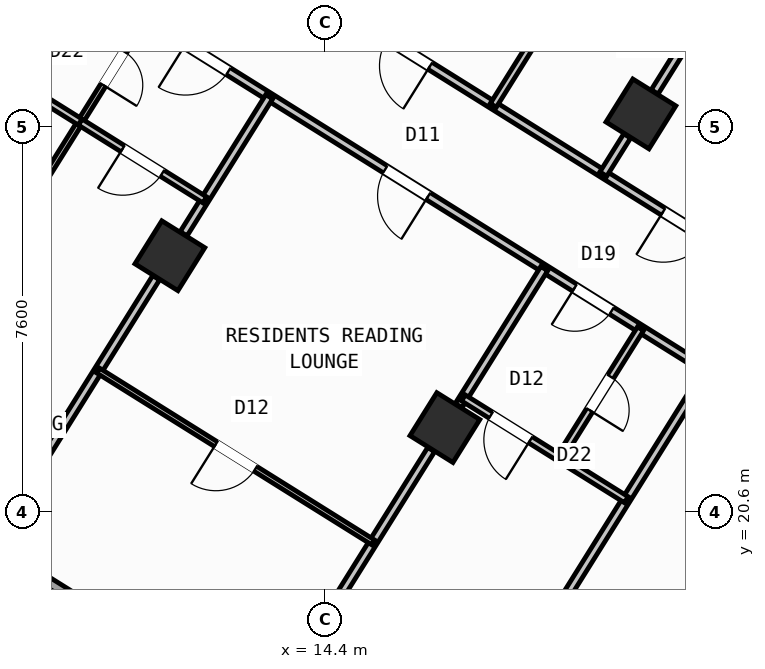
"""IFC4 building model, lengths in metres.
Left out: names, types, materials, properties, quantities, classifications, styles, units other than length and angle.
Written with IfcOpenShell. Run it as: python <this file> out.ifc"""

import sys

from ifc_helpers import new_model, si_unit, direction, frame, frame_2d, origin, origin_2d, place, context, subcontext, project, spatial, rectangle, hollow_rectangle, extrude, source, transform, mapped, element, fill, save


model = new_model("IFC4")
c1 = context("Model", 3, precision=1e-05, world=origin(), true_north=direction((0.0, 1.0)))
c2 = subcontext(c1, "Body", "Model", "MODEL_VIEW")
j1 = project(units=[si_unit("LENGTHUNIT", "METRE"), si_unit("PLANEANGLEUNIT", "RADIAN")], contexts=[c1])
p1 = place(None, origin())
s1 = spatial("IfcSite", under=j1, at=p1, CompositionType="ELEMENT")
p2 = place(p1, origin())
s2 = spatial("IfcBuilding", under=s1, at=p2, CompositionType="ELEMENT")
p3 = place(p2, frame((0.0, 0.0, 45.6)))
s3 = spatial("IfcBuildingStorey", under=s2, at=p3, CompositionType="ELEMENT", Elevation=45.6)
m1 = source(origin(), c2, "Body", "SweptSolid", [
    extrude(hollow_rectangle(XDim=1.0, YDim=1.0, WallThickness=0.04, at=origin_2d()), origin(), (0.0, 0.0, 1.0), 3.6),
])
for number, where, z_axis, x_axis in (
    (1, (22.191, 18.87, 0.0), (0.0, 0.0, 1.0), (-0.848, 0.53, 0.0)),
    (2, (20.632, 28.452, 0.0), (0.0, 0.0, 1.0), (-0.848, 0.53, 0.0)),
    (3, (16.764, 22.261, 0.0), (0.0, 0.0, 1.0), (-0.848, 0.53, 0.0)),
    (4, (11.336, 25.653, 0.0), (0.0, 0.0, 1.0), (-0.848, 0.53, 0.0)),
):
    element("IfcColumn", number, at=place(p3, frame(where, z_axis=z_axis, x_axis=x_axis)), inside=s3, PredefinedType="COLUMN", context=c2, shape_type="MappedRepresentation", body=[
        mapped(m1, transform((0.0, 0.0, 0.0), scale=1.0)),
    ])
p4 = place(p3, frame((29.268, 6.429, 0.0), z_axis=(0.0, 0.0, 1.0), x_axis=(-0.848049971435, 0.529916263149, 0.0)))
e5 = element("IfcWall", 5, at=p4, inside=s3, PredefinedType="STANDARD", context=c2, shape_type="SweptSolid", body=[
    extrude(rectangle(XDim=31.588, YDim=0.32, at=frame_2d((15.794, 0.0))), origin(), (0.0, 0.0, 1.0), 3.35),
])
p5 = place(p4, frame((16.362, 0.0, 0.0)))
e6 = element("IfcOpeningElement", 6, at=p5, cuts=e5, PredefinedType="OPENING", context=c2, shape_type="SweptSolid", body=[
    extrude(rectangle(XDim=1.2, YDim=2.15, at=frame_2d((0.6, 1.075))), frame((0.0, 0.17, 0.0), z_axis=(0.0, -1.0, 0.0), x_axis=(1.0, 0.0, 0.0)), (0.0, 0.0, 1.0), 0.34),
])
p6 = place(p4, frame((2.989, 0.0, 0.8)))
e7 = element("IfcOpeningElement", 7, at=p6, cuts=e5, PredefinedType="OPENING", context=c2, shape_type="SweptSolid", body=[
    extrude(rectangle(XDim=2.1, YDim=1.55, at=frame_2d((1.05, 0.775))), frame((0.0, 0.17, 0.0), z_axis=(0.0, -1.0, 0.0), x_axis=(1.0, 0.0, 0.0)), (0.0, 0.0, 1.0), 0.34),
])
p7 = place(p4, frame((8.359, 0.0, 0.8)))
e8 = element("IfcOpeningElement", 8, at=p7, cuts=e5, PredefinedType="OPENING", context=c2, shape_type="SweptSolid", body=[
    extrude(rectangle(XDim=2.1, YDim=1.55, at=frame_2d((1.05, 0.775))), frame((0.0, 0.17, 0.0), z_axis=(0.0, -1.0, 0.0), x_axis=(1.0, 0.0, 0.0)), (0.0, 0.0, 1.0), 0.34),
])
p8 = place(p4, frame((13.284, 0.0, 0.95)))
e9 = element("IfcOpeningElement", 9, at=p8, cuts=e5, PredefinedType="OPENING", context=c2, shape_type="SweptSolid", body=[
    extrude(rectangle(XDim=1.2, YDim=1.4, at=frame_2d((0.6, 0.7))), frame((0.0, 0.17, 0.0), z_axis=(0.0, -1.0, 0.0), x_axis=(1.0, 0.0, 0.0)), (0.0, 0.0, 1.0), 0.34),
])
p9 = place(p4, frame((20.259, 0.0, 0.95)))
e10 = element("IfcOpeningElement", 10, at=p9, cuts=e5, PredefinedType="OPENING", context=c2, shape_type="SweptSolid", body=[
    extrude(rectangle(XDim=1.2, YDim=1.4, at=frame_2d((0.6, 0.7))), frame((0.0, 0.17, 0.0), z_axis=(0.0, -1.0, 0.0), x_axis=(1.0, 0.0, 0.0)), (0.0, 0.0, 1.0), 0.34),
])
p10 = place(p4, frame((22.929, 0.0, 0.95)))
e11 = element("IfcOpeningElement", 11, at=p10, cuts=e5, PredefinedType="OPENING", context=c2, shape_type="SweptSolid", body=[
    extrude(rectangle(XDim=1.2, YDim=1.4, at=frame_2d((0.6, 0.7))), frame((0.0, 0.17, 0.0), z_axis=(0.0, -1.0, 0.0), x_axis=(1.0, 0.0, 0.0)), (0.0, 0.0, 1.0), 0.34),
])
p11 = place(p4, frame((26.106, 0.0, 0.85)))
e12 = element("IfcOpeningElement", 12, at=p11, cuts=e5, PredefinedType="OPENING", context=c2, shape_type="SweptSolid", body=[
    extrude(rectangle(XDim=1.5, YDim=1.5, at=frame_2d((0.75, 0.75))), frame((0.0, 0.17, 0.0), z_axis=(0.0, -1.0, 0.0), x_axis=(1.0, 0.0, 0.0)), (0.0, 0.0, 1.0), 0.34),
])
p12 = place(p4, frame((29.068, 0.0, 0.85)))
e13 = element("IfcOpeningElement", 13, at=p12, cuts=e5, PredefinedType="OPENING", context=c2, shape_type="SweptSolid", body=[
    extrude(rectangle(XDim=1.8, YDim=1.5, at=frame_2d((0.9, 0.75))), frame((0.0, 0.17, 0.0), z_axis=(0.0, -1.0, 0.0), x_axis=(1.0, 0.0, 0.0)), (0.0, 0.0, 1.0), 0.34),
])
p13 = place(p3, frame((2.415, 23.452, 0.0), z_axis=(0.0, 0.0, 1.0), x_axis=(0.52991049553, 0.848053575387, 0.0)))
e14 = element("IfcWall", 14, at=p13, inside=s3, PredefinedType="STANDARD", context=c2, shape_type="SweptSolid", body=[
    extrude(rectangle(XDim=21.587, YDim=0.32, at=frame_2d((10.794, 0.0))), origin(), (0.0, 0.0, 1.0), 2.725),
])
p14 = place(p13, frame((2.356, 0.0, 0.8)))
e15 = element("IfcOpeningElement", 15, at=p14, cuts=e14, PredefinedType="OPENING", context=c2, shape_type="SweptSolid", body=[
    extrude(rectangle(XDim=2.1, YDim=1.55, at=frame_2d((1.05, 0.775))), frame((0.0, 0.17, 0.0), z_axis=(0.0, -1.0, 0.0), x_axis=(1.0, 0.0, 0.0)), (0.0, 0.0, 1.0), 0.34),
])
p15 = place(p13, frame((8.639, 0.0, 1.0)))
e16 = element("IfcOpeningElement", 16, at=p15, cuts=e14, PredefinedType="OPENING", context=c2, shape_type="SweptSolid", body=[
    extrude(rectangle(XDim=0.9, YDim=1.25, at=frame_2d((0.45, 0.625))), frame((0.0, 0.17, 0.0), z_axis=(0.0, -1.0, 0.0), x_axis=(1.0, 0.0, 0.0)), (0.0, 0.0, 1.0), 0.34),
])
p16 = place(p13, frame((17.129, 0.0, 0.85)))
e17 = element("IfcOpeningElement", 17, at=p16, cuts=e14, PredefinedType="OPENING", context=c2, shape_type="SweptSolid", body=[
    extrude(rectangle(XDim=1.5, YDim=1.5, at=frame_2d((0.75, 0.75))), frame((0.0, 0.17, 0.0), z_axis=(0.0, -1.0, 0.0), x_axis=(1.0, 0.0, 0.0)), (0.0, 0.0, 1.0), 0.34),
])
p17 = place(p3, frame((14.138, 41.825, 0.0), z_axis=(0.0, 0.0, 1.0), x_axis=(0.848046498049, -0.529921821731, 0.0)))
e18 = element("IfcWall", 18, at=p17, inside=s3, PredefinedType="STANDARD", context=c2, shape_type="SweptSolid", body=[
    extrude(rectangle(XDim=31.588, YDim=0.32, at=frame_2d((15.794, 0.0))), origin(), (0.0, 0.0, 1.0), 3.35),
])
p18 = place(p17, frame((3.159, 0.0, 0.0)))
e19 = element("IfcOpeningElement", 19, at=p18, cuts=e18, PredefinedType="OPENING", context=c2, shape_type="SweptSolid", body=[
    extrude(rectangle(XDim=1.05, YDim=2.15, at=frame_2d((0.525, 1.075))), frame((0.0, 0.17, 0.0), z_axis=(0.0, -1.0, 0.0), x_axis=(1.0, 0.0, 0.0)), (0.0, 0.0, 1.0), 0.34),
])
p19 = place(p17, frame((0.906, 0.0, 1.0)))
e20 = element("IfcOpeningElement", 20, at=p19, cuts=e18, PredefinedType="OPENING", context=c2, shape_type="SweptSolid", body=[
    extrude(rectangle(XDim=0.9, YDim=1.25, at=frame_2d((0.45, 0.625))), frame((0.0, 0.17, 0.0), z_axis=(0.0, -1.0, 0.0), x_axis=(1.0, 0.0, 0.0)), (0.0, 0.0, 1.0), 0.34),
])
p20 = place(p17, frame((9.537, 0.0, 0.85)))
e21 = element("IfcOpeningElement", 21, at=p20, cuts=e18, PredefinedType="OPENING", context=c2, shape_type="SweptSolid", body=[
    extrude(rectangle(XDim=1.8, YDim=1.5, at=frame_2d((0.9, 0.75))), frame((0.0, 0.17, 0.0), z_axis=(0.0, -1.0, 0.0), x_axis=(1.0, 0.0, 0.0)), (0.0, 0.0, 1.0), 0.34),
])
p21 = place(p17, frame((13.899, 0.0, 0.85)))
e22 = element("IfcOpeningElement", 22, at=p21, cuts=e18, PredefinedType="OPENING", context=c2, shape_type="SweptSolid", body=[
    extrude(rectangle(XDim=1.5, YDim=1.5, at=frame_2d((0.75, 0.75))), frame((0.0, 0.17, 0.0), z_axis=(0.0, -1.0, 0.0), x_axis=(1.0, 0.0, 0.0)), (0.0, 0.0, 1.0), 0.34),
])
p22 = place(p17, frame((22.019, 0.0, 0.95)))
e23 = element("IfcOpeningElement", 23, at=p22, cuts=e18, PredefinedType="OPENING", context=c2, shape_type="SweptSolid", body=[
    extrude(rectangle(XDim=1.2, YDim=1.4, at=frame_2d((0.6, 0.7))), frame((0.0, 0.17, 0.0), z_axis=(0.0, -1.0, 0.0), x_axis=(1.0, 0.0, 0.0)), (0.0, 0.0, 1.0), 0.34),
])
p23 = place(p17, frame((27.569, 0.0, 0.95)))
e24 = element("IfcOpeningElement", 24, at=p23, cuts=e18, PredefinedType="OPENING", context=c2, shape_type="SweptSolid", body=[
    extrude(rectangle(XDim=1.2, YDim=1.4, at=frame_2d((0.6, 0.7))), frame((0.0, 0.17, 0.0), z_axis=(0.0, -1.0, 0.0), x_axis=(1.0, 0.0, 0.0)), (0.0, 0.0, 1.0), 0.34),
])
p24 = place(p3, frame((21.938, 23.391, 0.0), z_axis=(0.0, 0.0, 1.0), x_axis=(-0.529924725692, -0.848044683434, 0.0)))
e25 = element("IfcWall", 25, at=p24, inside=s3, PredefinedType="PARTITIONING", context=c2, shape_type="SweptSolid", body=[
    extrude(rectangle(XDim=10.35, YDim=0.16, at=frame_2d((5.175, 0.0))), origin(), (0.0, 0.0, 1.0), 3.34),
])
p25 = place(p3, frame((23.104, 25.256, 0.0), z_axis=(0.0, 0.0, 1.0), x_axis=(-0.848041752158, 0.529929416617, 0.0)))
e26 = element("IfcWall", 26, at=p25, inside=s3, PredefinedType="PARTITIONING", context=c2, shape_type="SweptSolid", body=[
    extrude(rectangle(XDim=16.73, YDim=0.16, at=frame_2d((8.365, 0.0))), origin(), (0.0, 0.0, 1.0), 3.34),
])
p26 = place(p25, frame((1.395, 0.0, 0.0)))
e27 = element("IfcOpeningElement", 27, at=p26, cuts=e26, PredefinedType="OPENING", context=c2, shape_type="SweptSolid", body=[
    extrude(rectangle(XDim=1.0, YDim=2.1, at=frame_2d((0.5, 1.05))), frame((0.0, 0.09, 0.0), z_axis=(0.0, -1.0, 0.0), x_axis=(1.0, 0.0, 0.0)), (0.0, 0.0, 1.0), 0.18),
])
p27 = place(p25, frame((7.82, 0.0, 0.0)))
e28 = element("IfcOpeningElement", 28, at=p27, cuts=e26, PredefinedType="OPENING", context=c2, shape_type="SweptSolid", body=[
    extrude(rectangle(XDim=1.0, YDim=2.1, at=frame_2d((0.5, 1.05))), frame((0.0, 0.09, 0.0), z_axis=(0.0, -1.0, 0.0), x_axis=(1.0, 0.0, 0.0)), (0.0, 0.0, 1.0), 0.18),
])
p28 = place(p25, frame((14.76, 0.0, 0.0)))
e29 = element("IfcOpeningElement", 29, at=p28, cuts=e26, PredefinedType="OPENING", context=c2, shape_type="SweptSolid", body=[
    extrude(rectangle(XDim=1.0, YDim=2.1, at=frame_2d((0.5, 1.05))), frame((0.0, 0.09, 0.0), z_axis=(0.0, -1.0, 0.0), x_axis=(1.0, 0.0, 0.0)), (0.0, 0.0, 1.0), 0.18),
])
p29 = place(p3, frame((21.938, 23.391, 0.0), z_axis=(0.0, 0.0, 1.0), x_axis=(-0.848045850158, 0.529922858565, 0.0)))
e30 = element("IfcWall", 30, at=p29, inside=s3, PredefinedType="PARTITIONING", context=c2, shape_type="SweptSolid", body=[
    extrude(rectangle(XDim=16.73, YDim=0.16, at=frame_2d((8.365, 0.0))), origin(), (0.0, 0.0, 1.0), 3.34),
])
p30 = place(p29, frame((2.22, 0.0, 0.0)))
e31 = element("IfcOpeningElement", 31, at=p30, cuts=e30, PredefinedType="OPENING", context=c2, shape_type="SweptSolid", body=[
    extrude(rectangle(XDim=0.86, YDim=2.05, at=frame_2d((0.43, 1.025))), frame((0.0, 0.09, 0.0), z_axis=(0.0, -1.0, 0.0), x_axis=(1.0, 0.0, 0.0)), (0.0, 0.0, 1.0), 0.18),
])
p31 = place(p29, frame((6.49, 0.0, 0.0)))
e32 = element("IfcOpeningElement", 32, at=p31, cuts=e30, PredefinedType="OPENING", context=c2, shape_type="SweptSolid", body=[
    extrude(rectangle(XDim=1.0, YDim=2.1, at=frame_2d((0.5, 1.05))), frame((0.0, 0.09, 0.0), z_axis=(0.0, -1.0, 0.0), x_axis=(1.0, 0.0, 0.0)), (0.0, 0.0, 1.0), 0.18),
])
p32 = place(p29, frame((11.14, 0.0, 0.0)))
e33 = element("IfcOpeningElement", 33, at=p32, cuts=e30, PredefinedType="OPENING", context=c2, shape_type="SweptSolid", body=[
    extrude(rectangle(XDim=1.0, YDim=2.1, at=frame_2d((0.5, 1.05))), frame((0.0, 0.09, 0.0), z_axis=(0.0, -1.0, 0.0), x_axis=(1.0, 0.0, 0.0)), (0.0, 0.0, 1.0), 0.18),
])
p33 = place(p3, frame((18.724, 25.399, 0.0), z_axis=(0.0, 0.0, 1.0), x_axis=(-0.529930102756, -0.848041323399, 0.0)))
e34 = element("IfcWall", 34, at=p33, inside=s3, PredefinedType="PARTITIONING", context=c2, shape_type="SweptSolid", body=[
    extrude(rectangle(XDim=3.188, YDim=0.16, at=frame_2d((1.594, 0.0))), origin(), (0.0, 0.0, 1.0), 2.725),
])
p34 = place(p3, frame((16.492, 21.827, 0.0), z_axis=(0.0, 0.0, 1.0), x_axis=(-0.529904608059, -0.848057254175, 0.0)))
e35 = element("IfcWall", 35, at=p34, inside=s3, PredefinedType="PARTITIONING", context=c2, shape_type="SweptSolid", body=[
    extrude(rectangle(XDim=5.351, YDim=0.16, at=frame_2d((2.675, 0.0))), origin(), (0.0, 0.0, 1.0), 2.725),
])
p35 = place(p3, frame((20.343, 20.838, 0.0), z_axis=(0.0, 0.0, 1.0), x_axis=(-0.848059820872, 0.529900500304, 0.0)))
e36 = element("IfcWall", 36, at=p35, inside=s3, PredefinedType="PLUMBINGWALL", context=c2, shape_type="SweptSolid", body=[
    extrude(rectangle(XDim=3.79, YDim=0.14, at=frame_2d((1.895, 0.0))), origin(), (0.0, 0.0, 1.0), 3.34),
])
p36 = place(p35, frame((2.23, 0.0, 0.0)))
e37 = element("IfcOpeningElement", 37, at=p36, cuts=e36, PredefinedType="OPENING", context=c2, shape_type="SweptSolid", body=[
    extrude(rectangle(XDim=0.92, YDim=2.08, at=frame_2d((0.46, 1.04))), frame((0.0, 0.08, 0.0), z_axis=(0.0, -1.0, 0.0), x_axis=(1.0, 0.0, 0.0)), (0.0, 0.0, 1.0), 0.16),
])
p37 = place(p3, frame((20.624, 24.212, 0.0), z_axis=(0.0, 0.0, 1.0), x_axis=(-0.529940615993, -0.848034753722, 0.0)))
e38 = element("IfcWall", 38, at=p37, inside=s3, PredefinedType="PLUMBINGWALL", context=c2, shape_type="SweptSolid", body=[
    extrude(rectangle(XDim=3.01, YDim=0.14, at=frame_2d((1.505, 0.0))), origin(), (0.0, 0.0, 1.0), 2.995),
])
p38 = place(p37, frame((1.115, 0.0, 0.0)))
e39 = element("IfcOpeningElement", 39, at=p38, cuts=e38, PredefinedType="OPENING", context=c2, shape_type="SweptSolid", body=[
    extrude(rectangle(XDim=0.78, YDim=2.05, at=frame_2d((0.39, 1.025))), frame((0.0, 0.08, 0.0), z_axis=(0.0, -1.0, 0.0), x_axis=(1.0, 0.0, 0.0)), (0.0, 0.0, 1.0), 0.16),
])
p39 = place(p3, frame((13.297, 28.791, 0.0), z_axis=(0.0, 0.0, 1.0), x_axis=(-0.529930102756, -0.848041323399, 0.0)))
e40 = element("IfcWall", 40, at=p39, inside=s3, PredefinedType="PARTITIONING", context=c2, shape_type="SweptSolid", body=[
    extrude(rectangle(XDim=3.188, YDim=0.16, at=frame_2d((1.594, 0.0))), origin(), (0.0, 0.0, 1.0), 2.725),
])
p40 = place(p3, frame((11.065, 25.219, 0.0), z_axis=(0.0, 0.0, 1.0), x_axis=(-0.529904608059, -0.848057254175, 0.0)))
e41 = element("IfcWall", 41, at=p40, inside=s3, PredefinedType="PARTITIONING", context=c2, shape_type="SweptSolid", body=[
    extrude(rectangle(XDim=5.351, YDim=0.16, at=frame_2d((2.675, 0.0))), origin(), (0.0, 0.0, 1.0), 2.725),
])
p41 = place(p3, frame((15.348, 19.995, 0.0), z_axis=(0.0, 0.0, 1.0), x_axis=(-0.848056163074, 0.529906354247, 0.0)))
e42 = element("IfcWall", 42, at=p41, inside=s3, PredefinedType="PARTITIONING", context=c2, shape_type="SweptSolid", body=[
    extrude(rectangle(XDim=6.4, YDim=0.11, at=frame_2d((3.2, 0.0))), origin(), (0.0, 0.0, 1.0), 3.34),
])
p42 = place(p41, frame((2.74, 0.0, 0.0)))
e43 = element("IfcOpeningElement", 43, at=p42, cuts=e42, PredefinedType="OPENING", context=c2, shape_type="SweptSolid", body=[
    extrude(rectangle(XDim=0.92, YDim=2.08, at=frame_2d((0.46, 1.04))), frame((0.0, 0.065, 0.0), z_axis=(0.0, -1.0, 0.0), x_axis=(1.0, 0.0, 0.0)), (0.0, 0.0, 1.0), 0.13),
])
p43 = place(p3, frame((10.837, 30.327, 0.0), z_axis=(0.0, 0.0, 1.0), x_axis=(-0.529912148489, -0.848052542525, 0.0)))
e44 = element("IfcWall", 44, at=p43, inside=s3, PredefinedType="PARTITIONING", context=c2, shape_type="SweptSolid", body=[
    extrude(rectangle(XDim=10.62, YDim=0.11, at=frame_2d((5.31, 0.0))), origin(), (0.0, 0.0, 1.0), 3.34),
])
p44 = place(p43, frame((0.76, 0.0, 0.0)))
e45 = element("IfcOpeningElement", 45, at=p44, cuts=e44, PredefinedType="OPENING", context=c2, shape_type="SweptSolid", body=[
    extrude(rectangle(XDim=0.78, YDim=2.05, at=frame_2d((0.39, 1.025))), frame((0.0, 0.065, 0.0), z_axis=(0.0, -1.0, 0.0), x_axis=(1.0, 0.0, 0.0)), (0.0, 0.0, 1.0), 0.13),
])
p45 = place(p43, frame((6.05, 0.0, 0.0)))
e46 = element("IfcOpeningElement", 46, at=p45, cuts=e44, PredefinedType="OPENING", context=c2, shape_type="SweptSolid", body=[
    extrude(rectangle(XDim=0.92, YDim=2.08, at=frame_2d((0.46, 1.04))), frame((0.0, 0.065, 0.0), z_axis=(0.0, -1.0, 0.0), x_axis=(1.0, 0.0, 0.0)), (0.0, 0.0, 1.0), 0.13),
])
p46 = place(p3, frame((12.025, 26.755, 0.0), z_axis=(0.0, 0.0, 1.0), x_axis=(-0.848059786386, 0.529900555496, 0.0)))
e47 = element("IfcWall", 47, at=p46, inside=s3, PredefinedType="PLUMBINGWALL", context=c2, shape_type="SweptSolid", body=[
    extrude(rectangle(XDim=2.9, YDim=0.14, at=frame_2d((1.45, 0.0))), origin(), (0.0, 0.0, 1.0), 3.34),
])
p47 = place(p46, frame((0.99, 0.0, 0.0)))
e48 = element("IfcOpeningElement", 48, at=p47, cuts=e47, PredefinedType="OPENING", context=c2, shape_type="SweptSolid", body=[
    extrude(rectangle(XDim=0.92, YDim=2.08, at=frame_2d((0.46, 1.04))), frame((0.0, 0.08, 0.0), z_axis=(0.0, -1.0, 0.0), x_axis=(1.0, 0.0, 0.0)), (0.0, 0.0, 1.0), 0.16),
])
p48 = place(p3, frame((9.566, 28.292, 0.0), z_axis=(0.0, 0.0, 1.0), x_axis=(-0.848021036626, 0.529962566074, 0.0)))
e49 = element("IfcWall", 49, at=p48, inside=s3, PredefinedType="PLUMBINGWALL", context=c2, shape_type="SweptSolid", body=[
    extrude(rectangle(XDim=3.62, YDim=0.14, at=frame_2d((1.81, 0.0))), origin(), (0.0, 0.0, 1.0), 3.34),
])
p49 = place(p3, frame((24.229, 34.209, 0.0), z_axis=(0.0, 0.0, 1.0), x_axis=(-0.529897533635, -0.848061674554, 0.0)))
e50 = element("IfcWall", 50, at=p49, inside=s3, PredefinedType="PARTITIONING", context=c2, shape_type="SweptSolid", body=[
    extrude(rectangle(XDim=6.276, YDim=0.16, at=frame_2d((3.138, 0.0))), origin(), (0.0, 0.0, 1.0), 2.725),
])
p50 = place(p3, frame((20.361, 28.018, 0.0), z_axis=(0.0, 0.0, 1.0), x_axis=(-0.529900064649, -0.848060093086, 0.0)))
e51 = element("IfcWall", 51, at=p50, inside=s3, PredefinedType="PARTITIONING", context=c2, shape_type="SweptSolid", body=[
    extrude(rectangle(XDim=0.888, YDim=0.16, at=frame_2d((0.444, 0.0))), origin(), (0.0, 0.0, 1.0), 2.725),
])
p51 = place(p3, frame((19.616, 31.657, 0.0), z_axis=(0.0, 0.0, 1.0), x_axis=(-0.529876336437, -0.84807491891, 0.0)))
e52 = element("IfcWall", 52, at=p51, inside=s3, PredefinedType="PLUMBINGWALL", context=c2, shape_type="SweptSolid", body=[
    extrude(rectangle(XDim=3.58, YDim=0.14, at=frame_2d((1.79, 0.0))), origin(), (0.0, 0.0, 1.0), 3.34),
])
p52 = place(p51, frame((1.4, 0.0, 0.0)))
e53 = element("IfcOpeningElement", 53, at=p52, cuts=e52, PredefinedType="OPENING", context=c2, shape_type="SweptSolid", body=[
    extrude(rectangle(XDim=0.78, YDim=2.05, at=frame_2d((0.39, 1.025))), frame((0.0, 0.08, 0.0), z_axis=(0.0, -1.0, 0.0), x_axis=(1.0, 0.0, 0.0)), (0.0, 0.0, 1.0), 0.16),
])
m2 = source(origin(), c2, "Body", "SweptSolid", [
    extrude(rectangle(XDim=1.2, YDim=1.4, at=frame_2d((0.6, 0.7))), frame((0.0, 0.03, 0.0), z_axis=(0.0, -1.0, 0.0), x_axis=(1.0, 0.0, 0.0)), (0.0, 0.0, 1.0), 0.06),
])
p53 = place(p10, origin())
e54 = element("IfcWindow", 54, at=p53, inside=s3, PartitioningType="SINGLE_PANEL", PredefinedType="WINDOW", context=c2, shape_type="MappedRepresentation", body=[
    mapped(m2, transform((0.0, 0.0, 0.0), scale=1.0)),
])
fill(e11, e54)
m3 = source(origin(), c2, "Body", "SweptSolid", [
    extrude(rectangle(XDim=0.86, YDim=2.05, at=frame_2d((0.43, 1.025))), frame((0.0, 0.025, 0.0), z_axis=(0.0, -1.0, 0.0), x_axis=(1.0, 0.0, 0.0)), (0.0, 0.0, 1.0), 0.05),
])
p54 = place(p30, origin())
e55 = element("IfcDoor", 55, at=p54, inside=s3, OperationType="SINGLE_SWING_RIGHT", PredefinedType="DOOR", context=c2, shape_type="MappedRepresentation", body=[
    mapped(m3, transform((0.0, 0.0, 0.0), scale=1.0)),
])
fill(e31, e55)
m4 = source(origin(), c2, "Body", "SweptSolid", [
    extrude(rectangle(XDim=0.92, YDim=2.08, at=frame_2d((0.46, 1.04))), frame((0.0, 0.025, 0.0), z_axis=(0.0, -1.0, 0.0), x_axis=(1.0, 0.0, 0.0)), (0.0, 0.0, 1.0), 0.05),
])
p55 = place(p36, origin())
e56 = element("IfcDoor", 56, at=p55, inside=s3, OperationType="SINGLE_SWING_LEFT", PredefinedType="DOOR", context=c2, shape_type="MappedRepresentation", body=[
    mapped(m4, transform((0.0, 0.0, 0.0), scale=1.0)),
])
fill(e37, e56)
m5 = source(origin(), c2, "Body", "SweptSolid", [
    extrude(rectangle(XDim=0.78, YDim=2.05, at=frame_2d((0.39, 1.025))), frame((0.0, 0.025, 0.0), z_axis=(0.0, -1.0, 0.0), x_axis=(1.0, 0.0, 0.0)), (0.0, 0.0, 1.0), 0.05),
])
p56 = place(p38, origin())
e57 = element("IfcDoor", 57, at=p56, inside=s3, OperationType="SINGLE_SWING_RIGHT", PredefinedType="DOOR", context=c2, shape_type="MappedRepresentation", body=[
    mapped(m5, transform((0.0, 0.0, 0.0), scale=1.0)),
])
fill(e39, e57)
m6 = source(origin(), c2, "Body", "SweptSolid", [
    extrude(rectangle(XDim=1.0, YDim=2.1, at=frame_2d((0.5, 1.05))), frame((0.0, 0.025, 0.0), z_axis=(0.0, -1.0, 0.0), x_axis=(1.0, 0.0, 0.0)), (0.0, 0.0, 1.0), 0.05),
])
p57 = place(p31, origin())
e58 = element("IfcDoor", 58, at=p57, inside=s3, OperationType="SINGLE_SWING_LEFT", PredefinedType="DOOR", context=c2, shape_type="MappedRepresentation", body=[
    mapped(m6, transform((0.0, 0.0, 0.0), scale=1.0)),
])
fill(e32, e58)
p58 = place(p42, origin())
e59 = element("IfcDoor", 59, at=p58, inside=s3, OperationType="SINGLE_SWING_RIGHT", PredefinedType="DOOR", context=c2, shape_type="MappedRepresentation", body=[
    mapped(m4, transform((0.0, 0.0, 0.0), scale=1.0)),
])
fill(e43, e59)
p59 = place(p32, origin())
e60 = element("IfcDoor", 60, at=p59, inside=s3, OperationType="SINGLE_SWING_RIGHT", PredefinedType="DOOR", context=c2, shape_type="MappedRepresentation", body=[
    mapped(m6, transform((0.0, 0.0, 0.0), scale=1.0)),
])
fill(e33, e60)
p60 = place(p47, origin())
e61 = element("IfcDoor", 61, at=p60, inside=s3, OperationType="SINGLE_SWING_RIGHT", PredefinedType="DOOR", context=c2, shape_type="MappedRepresentation", body=[
    mapped(m4, transform((0.0, 0.0, 0.0), scale=1.0)),
])
fill(e48, e61)
p61 = place(p44, origin())
e62 = element("IfcDoor", 62, at=p61, inside=s3, OperationType="SINGLE_SWING_RIGHT", PredefinedType="DOOR", context=c2, shape_type="MappedRepresentation", body=[
    mapped(m5, transform((0.0, 0.0, 0.0), scale=1.0)),
])
fill(e45, e62)
p62 = place(p26, origin())
e63 = element("IfcDoor", 63, at=p62, inside=s3, OperationType="SINGLE_SWING_RIGHT", PredefinedType="DOOR", context=c2, shape_type="MappedRepresentation", body=[
    mapped(m6, transform((0.0, 0.0, 0.0), scale=1.0)),
])
fill(e27, e63)
p63 = place(p27, origin())
e64 = element("IfcDoor", 64, at=p63, inside=s3, OperationType="SINGLE_SWING_LEFT", PredefinedType="DOOR", context=c2, shape_type="MappedRepresentation", body=[
    mapped(m6, transform((0.0, 0.0, 0.0), scale=1.0)),
])
fill(e28, e64)
save(model, sys.argv[1])
